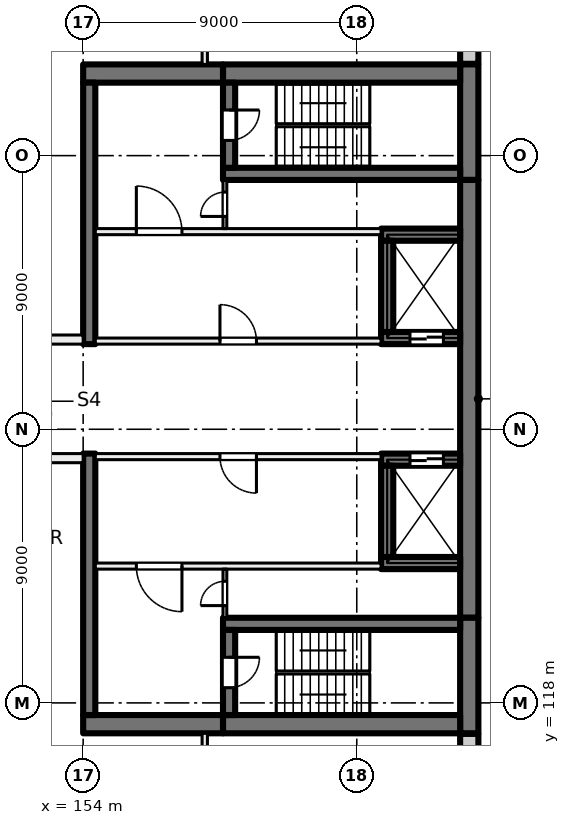
"""IFC4 building model, lengths in metres.
Left out: names, types, materials, properties, quantities, classifications, styles, units other than length and angle.
Written with IfcOpenShell. Run it as: python <this file> out.ifc"""

import sys

from ifc_helpers import new_model, si_unit, direction, frame, frame_2d, origin, place, context, subcontext, project, spatial, rectangle, extrude, element, fill, save


model = new_model("IFC4")
c1 = context("Model", 3, precision=1e-05, world=origin(), true_north=direction((0.0, 1.0)))
c2 = subcontext(c1, "Body", "Model", "MODEL_VIEW")
j1 = project(units=[si_unit("LENGTHUNIT", "METRE"), si_unit("PLANEANGLEUNIT", "RADIAN")], contexts=[c1])
p1 = place(None, origin())
s1 = spatial("IfcSite", under=j1, at=p1, CompositionType="ELEMENT")
p2 = place(p1, origin())
s2 = spatial("IfcBuilding", under=s1, at=p2, CompositionType="ELEMENT")
p3 = place(p2, frame((0.0, 0.0, 35.5)))
s3 = spatial("IfcBuildingStorey", under=s2, at=p3, CompositionType="ELEMENT", Elevation=35.5)
p4 = place(p3, frame((166.7, 139.0, 0.0), z_axis=(0.0, 0.0, 1.0), x_axis=(0.0, -1.0, 0.0)))
e1 = element("IfcWall", 1, at=p4, inside=s3, PredefinedType="SHEAR", context=c2, shape_type="SweptSolid", body=[
    extrude(rectangle(XDim=3.8, YDim=0.6, at=frame_2d((1.9, 0.0))), origin(), (0.0, 0.0, 1.0), 4.0),
])
p5 = place(p3, frame((166.7, 135.2, 0.0), z_axis=(0.0, 0.0, 1.0), x_axis=(0.0, -1.0, 0.0)))
e2 = element("IfcWall", 2, at=p5, inside=s3, PredefinedType="SHEAR", context=c2, shape_type="SweptSolid", body=[
    extrude(rectangle(XDim=14.4, YDim=0.6, at=frame_2d((7.2, 0.0))), origin(), (0.0, 0.0, 1.0), 4.0),
])
p6 = place(p3, frame((166.7, 120.8, 0.0), z_axis=(0.0, 0.0, 1.0), x_axis=(0.0, -1.0, 0.0)))
e3 = element("IfcWall", 3, at=p6, inside=s3, PredefinedType="SHEAR", context=c2, shape_type="SweptSolid", body=[
    extrude(rectangle(XDim=3.8, YDim=0.6, at=frame_2d((1.9, 0.0))), origin(), (0.0, 0.0, 1.0), 4.0),
])
for number, where, z_axis, x_axis in (
    (4, (166.4, 138.7, 0.0), (0.0, 0.0, 1.0), (-1.0, 0.0, 0.0)),
    (5, (166.4, 117.3, 0.0), (0.0, 0.0, 1.0), (-1.0, 0.0, 0.0)),
):
    element("IfcWall", number, at=place(p3, frame(where, z_axis=z_axis, x_axis=x_axis)), inside=s3, PredefinedType="SHEAR", context=c2, shape_type="SweptSolid", body=[
        extrude(rectangle(XDim=7.8, YDim=0.6, at=frame_2d((3.9, 0.0))), origin(), (0.0, 0.0, 1.0), 4.0),
    ])
for number, where, z_axis, x_axis in (
    (6, (158.6, 138.7, 0.0), (0.0, 0.0, 1.0), (-1.0, 0.0, 0.0)),
    (7, (158.6, 117.3, 0.0), (0.0, 0.0, 1.0), (-1.0, 0.0, 0.0)),
):
    element("IfcWall", number, at=place(p3, frame(where, z_axis=z_axis, x_axis=x_axis)), inside=s3, PredefinedType="SHEAR", context=c2, shape_type="SweptSolid", body=[
        extrude(rectangle(XDim=4.6, YDim=0.6, at=frame_2d((2.3, 0.0))), origin(), (0.0, 0.0, 1.0), 4.0),
    ])
p7 = place(p3, frame((166.4, 135.4, 0.0), z_axis=(0.0, 0.0, 1.0), x_axis=(-1.0, 0.0, 0.0)))
e8 = element("IfcWall", 8, at=p7, inside=s3, PredefinedType="SHEAR", context=c2, shape_type="SweptSolid", body=[
    extrude(rectangle(XDim=7.8, YDim=0.4, at=frame_2d((3.9, 0.0))), origin(), (0.0, 0.0, 1.0), 4.0),
])
p8 = place(p3, frame((158.8, 138.4, 0.0), z_axis=(0.0, 0.0, 1.0), x_axis=(0.0, -1.0, 0.0)))
e9 = element("IfcWall", 9, at=p8, inside=s3, PredefinedType="SHEAR", context=c2, shape_type="SweptSolid", body=[
    extrude(rectangle(XDim=2.8, YDim=0.4, at=frame_2d((1.4, 0.0))), origin(), (0.0, 0.0, 1.0), 4.0),
])
p9 = place(p8, frame((0.9, 0.0, 0.0)))
e10 = element("IfcOpeningElement", 10, at=p9, cuts=e9, PredefinedType="OPENING", context=c2, shape_type="SweptSolid", body=[
    extrude(rectangle(XDim=1.0, YDim=2.1, at=frame_2d((0.5, 1.05))), frame((0.0, 0.21, 0.0), z_axis=(0.0, -1.0, 0.0), x_axis=(1.0, 0.0, 0.0)), (0.0, 0.0, 1.0), 0.42),
])
p10 = place(p3, frame((166.4, 120.6, 0.0), z_axis=(0.0, 0.0, 1.0), x_axis=(-1.0, 0.0, 0.0)))
e11 = element("IfcWall", 11, at=p10, inside=s3, PredefinedType="SHEAR", context=c2, shape_type="SweptSolid", body=[
    extrude(rectangle(XDim=7.8, YDim=0.4, at=frame_2d((3.9, 0.0))), origin(), (0.0, 0.0, 1.0), 4.0),
])
p11 = place(p3, frame((158.8, 120.4, 0.0), z_axis=(0.0, 0.0, 1.0), x_axis=(0.0, -1.0, 0.0)))
e12 = element("IfcWall", 12, at=p11, inside=s3, PredefinedType="SHEAR", context=c2, shape_type="SweptSolid", body=[
    extrude(rectangle(XDim=2.8, YDim=0.4, at=frame_2d((1.4, 0.0))), origin(), (0.0, 0.0, 1.0), 4.0),
])
p12 = place(p11, frame((0.9, 0.0, 0.0)))
e13 = element("IfcOpeningElement", 13, at=p12, cuts=e12, PredefinedType="OPENING", context=c2, shape_type="SweptSolid", body=[
    extrude(rectangle(XDim=1.0, YDim=2.1, at=frame_2d((0.5, 1.05))), frame((0.0, 0.21, 0.0), z_axis=(0.0, -1.0, 0.0), x_axis=(1.0, 0.0, 0.0)), (0.0, 0.0, 1.0), 0.42),
])
p13 = place(p3, frame((166.4, 130.0, 0.0), z_axis=(0.0, 0.0, 1.0), x_axis=(-1.0, 0.0, 0.0)))
e14 = element("IfcWall", 14, at=p13, inside=s3, PredefinedType="SHEAR", context=c2, shape_type="SweptSolid", body=[
    extrude(rectangle(XDim=2.6, YDim=0.4, at=frame_2d((1.3, 0.0))), origin(), (0.0, 0.0, 1.0), 4.0),
])
p14 = place(p13, frame((0.55, 0.0, 0.0)))
e15 = element("IfcOpeningElement", 15, at=p14, cuts=e14, PredefinedType="OPENING", context=c2, shape_type="SweptSolid", body=[
    extrude(rectangle(XDim=1.1, YDim=2.1, at=frame_2d((0.55, 1.05))), frame((0.0, 0.21, 0.0), z_axis=(0.0, -1.0, 0.0), x_axis=(1.0, 0.0, 0.0)), (0.0, 0.0, 1.0), 0.42),
])
p15 = place(p3, frame((166.4, 133.4, 0.0), z_axis=(0.0, 0.0, 1.0), x_axis=(-1.0, 0.0, 0.0)))
e16 = element("IfcWall", 16, at=p15, inside=s3, PredefinedType="SHEAR", context=c2, shape_type="SweptSolid", body=[
    extrude(rectangle(XDim=2.6, YDim=0.4, at=frame_2d((1.3, 0.0))), origin(), (0.0, 0.0, 1.0), 4.0),
])
p16 = place(p3, frame((164.0, 133.2, 0.0), z_axis=(0.0, 0.0, 1.0), x_axis=(0.0, -1.0, 0.0)))
e17 = element("IfcWall", 17, at=p16, inside=s3, PredefinedType="SHEAR", context=c2, shape_type="SweptSolid", body=[
    extrude(rectangle(XDim=3.0, YDim=0.4, at=frame_2d((1.5, 0.0))), origin(), (0.0, 0.0, 1.0), 4.0),
])
p17 = place(p3, frame((166.4, 126.0, 0.0), z_axis=(0.0, 0.0, 1.0), x_axis=(-1.0, 0.0, 0.0)))
e18 = element("IfcWall", 18, at=p17, inside=s3, PredefinedType="SHEAR", context=c2, shape_type="SweptSolid", body=[
    extrude(rectangle(XDim=2.6, YDim=0.4, at=frame_2d((1.3, 0.0))), origin(), (0.0, 0.0, 1.0), 4.0),
])
p18 = place(p17, frame((0.55, 0.0, 0.0)))
e19 = element("IfcOpeningElement", 19, at=p18, cuts=e18, PredefinedType="OPENING", context=c2, shape_type="SweptSolid", body=[
    extrude(rectangle(XDim=1.1, YDim=2.1, at=frame_2d((0.55, 1.05))), frame((0.0, 0.21, 0.0), z_axis=(0.0, -1.0, 0.0), x_axis=(1.0, 0.0, 0.0)), (0.0, 0.0, 1.0), 0.42),
])
p19 = place(p3, frame((166.4, 122.6, 0.0), z_axis=(0.0, 0.0, 1.0), x_axis=(-1.0, 0.0, 0.0)))
e20 = element("IfcWall", 20, at=p19, inside=s3, PredefinedType="SHEAR", context=c2, shape_type="SweptSolid", body=[
    extrude(rectangle(XDim=2.6, YDim=0.4, at=frame_2d((1.3, 0.0))), origin(), (0.0, 0.0, 1.0), 4.0),
])
p20 = place(p3, frame((164.0, 125.8, 0.0), z_axis=(0.0, 0.0, 1.0), x_axis=(0.0, -1.0, 0.0)))
e21 = element("IfcWall", 21, at=p20, inside=s3, PredefinedType="SHEAR", context=c2, shape_type="SweptSolid", body=[
    extrude(rectangle(XDim=3.0, YDim=0.4, at=frame_2d((1.5, 0.0))), origin(), (0.0, 0.0, 1.0), 4.0),
])
for number, where, z_axis, x_axis in (
    (22, (154.2, 138.4, 0.0), (0.0, 0.0, 1.0), (0.0, -1.0, 0.0)),
    (23, (154.2, 126.2, 0.0), (0.0, 0.0, 1.0), (0.0, -1.0, 0.0)),
):
    element("IfcWall", number, at=place(p3, frame(where, z_axis=z_axis, x_axis=x_axis)), inside=s3, PredefinedType="SHEAR", context=c2, shape_type="SweptSolid", body=[
        extrude(rectangle(XDim=8.6, YDim=0.4, at=frame_2d((4.3, 0.0))), origin(), (0.0, 0.0, 1.0), 4.0),
    ])
p21 = place(p3, frame((166.7, 116.98, 0.0), z_axis=(0.0, 0.0, 1.0), x_axis=(0.0, -1.0, 0.0)))
e24 = element("IfcWall", 24, at=p21, inside=s3, PredefinedType="SOLIDWALL", context=c2, shape_type="SweptSolid", body=[
    extrude(rectangle(XDim=2.98, YDim=0.6, at=frame_2d((1.49, 0.0))), origin(), (0.0, 0.0, 1.0), 3.625),
])
p22 = place(p3, frame((166.7, 141.93, 0.0), z_axis=(0.0, 0.0, 1.0), x_axis=(0.0, -1.0, 0.0)))
e25 = element("IfcWall", 25, at=p22, inside=s3, PredefinedType="SOLIDWALL", context=c2, shape_type="SweptSolid", body=[
    extrude(rectangle(XDim=2.91, YDim=0.6, at=frame_2d((1.455, 0.0))), origin(), (0.0, 0.0, 1.0), 3.625),
])
p23 = place(p3, frame((163.8, 126.1, 0.0), z_axis=(0.0, 0.0, 1.0), x_axis=(-1.0, 0.0, 0.0)))
e26 = element("IfcWall", 26, at=p23, inside=s3, PredefinedType="PARTITIONING", context=c2, shape_type="SweptSolid", body=[
    extrude(rectangle(XDim=9.4, YDim=0.2, at=frame_2d((4.7, 0.0))), origin(), (0.0, 0.0, 1.0), 3.625),
])
p24 = place(p23, frame((4.1, 0.0, 0.0)))
e27 = element("IfcOpeningElement", 27, at=p24, cuts=e26, PredefinedType="OPENING", context=c2, shape_type="SweptSolid", body=[
    extrude(rectangle(XDim=1.2, YDim=2.1, at=frame_2d((0.6, 1.05))), frame((0.0, 0.11, 0.0), z_axis=(0.0, -1.0, 0.0), x_axis=(1.0, 0.0, 0.0)), (0.0, 0.0, 1.0), 0.22),
])
p25 = place(p3, frame((163.8, 122.5, 0.0), z_axis=(0.0, 0.0, 1.0), x_axis=(-1.0, 0.0, 0.0)))
e28 = element("IfcWall", 28, at=p25, inside=s3, PredefinedType="PARTITIONING", context=c2, shape_type="SweptSolid", body=[
    extrude(rectangle(XDim=9.4, YDim=0.2, at=frame_2d((4.7, 0.0))), origin(), (0.0, 0.0, 1.0), 3.625),
])
p26 = place(p25, frame((6.55, 0.0, 0.0)))
e29 = element("IfcOpeningElement", 29, at=p26, cuts=e28, PredefinedType="OPENING", context=c2, shape_type="SweptSolid", body=[
    extrude(rectangle(XDim=1.5, YDim=2.1, at=frame_2d((0.75, 1.05))), frame((0.0, 0.11, 0.0), z_axis=(0.0, -1.0, 0.0), x_axis=(1.0, 0.0, 0.0)), (0.0, 0.0, 1.0), 0.22),
])
p27 = place(p3, frame((158.663, 120.8, 0.0), z_axis=(0.0, 0.0, 1.0), x_axis=(0.0, 1.0, 0.0)))
e30 = element("IfcWall", 30, at=p27, inside=s3, PredefinedType="PARTITIONING", context=c2, shape_type="SweptSolid", body=[
    extrude(rectangle(XDim=1.6, YDim=0.125, at=frame_2d((0.8, 0.0))), origin(), (0.0, 0.0, 1.0), 3.625),
])
p28 = place(p27, frame((0.4, 0.0, 0.0)))
e31 = element("IfcOpeningElement", 31, at=p28, cuts=e30, PredefinedType="OPENING", context=c2, shape_type="SweptSolid", body=[
    extrude(rectangle(XDim=0.8, YDim=2.1, at=frame_2d((0.4, 1.05))), frame((0.0, 0.073, 0.0), z_axis=(0.0, -1.0, 0.0), x_axis=(1.0, 0.0, 0.0)), (0.0, 0.0, 1.0), 0.145),
])
p29 = place(p3, frame((154.4, 129.9, 0.0), z_axis=(0.0, 0.0, 1.0), x_axis=(1.0, 0.0, 0.0)))
e32 = element("IfcWall", 32, at=p29, inside=s3, PredefinedType="PARTITIONING", context=c2, shape_type="SweptSolid", body=[
    extrude(rectangle(XDim=9.4, YDim=0.2, at=frame_2d((4.7, 0.0))), origin(), (0.0, 0.0, 1.0), 3.625),
])
p30 = place(p29, frame((4.1, 0.0, 0.0)))
e33 = element("IfcOpeningElement", 33, at=p30, cuts=e32, PredefinedType="OPENING", context=c2, shape_type="SweptSolid", body=[
    extrude(rectangle(XDim=1.2, YDim=2.1, at=frame_2d((0.6, 1.05))), frame((0.0, 0.11, 0.0), z_axis=(0.0, -1.0, 0.0), x_axis=(1.0, 0.0, 0.0)), (0.0, 0.0, 1.0), 0.22),
])
p31 = place(p3, frame((154.4, 133.5, 0.0), z_axis=(0.0, 0.0, 1.0), x_axis=(1.0, 0.0, 0.0)))
e34 = element("IfcWall", 34, at=p31, inside=s3, PredefinedType="PARTITIONING", context=c2, shape_type="SweptSolid", body=[
    extrude(rectangle(XDim=9.4, YDim=0.2, at=frame_2d((4.7, 0.0))), origin(), (0.0, 0.0, 1.0), 3.625),
])
p32 = place(p31, frame((1.35, 0.0, 0.0)))
e35 = element("IfcOpeningElement", 35, at=p32, cuts=e34, PredefinedType="OPENING", context=c2, shape_type="SweptSolid", body=[
    extrude(rectangle(XDim=1.5, YDim=2.1, at=frame_2d((0.75, 1.05))), frame((0.0, 0.11, 0.0), z_axis=(0.0, -1.0, 0.0), x_axis=(1.0, 0.0, 0.0)), (0.0, 0.0, 1.0), 0.22),
])
p33 = place(p3, frame((158.663, 133.6, 0.0), z_axis=(0.0, 0.0, 1.0), x_axis=(0.0, 1.0, 0.0)))
e36 = element("IfcWall", 36, at=p33, inside=s3, PredefinedType="PARTITIONING", context=c2, shape_type="SweptSolid", body=[
    extrude(rectangle(XDim=1.6, YDim=0.125, at=frame_2d((0.8, 0.0))), origin(), (0.0, 0.0, 1.0), 3.625),
])
p34 = place(p33, frame((0.4, 0.0, 0.0)))
e37 = element("IfcOpeningElement", 37, at=p34, cuts=e36, PredefinedType="OPENING", context=c2, shape_type="SweptSolid", body=[
    extrude(rectangle(XDim=0.8, YDim=2.1, at=frame_2d((0.4, 1.05))), frame((0.0, 0.073, 0.0), z_axis=(0.0, -1.0, 0.0), x_axis=(1.0, 0.0, 0.0)), (0.0, 0.0, 1.0), 0.145),
])
p35 = place(p3, frame((140.0, 129.95, 0.0), z_axis=(0.0, 0.0, 1.0), x_axis=(1.0, 0.0, 0.0)))
e38 = element("IfcWall", 38, at=p35, inside=s3, PredefinedType="PARTITIONING", context=c2, shape_type="SweptSolid", body=[
    extrude(rectangle(XDim=14.0, YDim=0.3, at=frame_2d((7.0, 0.0))), origin(), (0.0, 0.0, 1.0), 3.625),
])
p36 = place(p35, frame((6.1, 0.0, 0.0)))
e39 = element("IfcOpeningElement", 39, at=p36, cuts=e38, PredefinedType="OPENING", context=c2, shape_type="SweptSolid", body=[
    extrude(rectangle(XDim=1.8, YDim=2.1, at=frame_2d((0.9, 1.05))), frame((0.0, 0.16, 0.0), z_axis=(0.0, -1.0, 0.0), x_axis=(1.0, 0.0, 0.0)), (0.0, 0.0, 1.0), 0.32),
])
p37 = place(p3, frame((154.0, 126.05, 0.0), z_axis=(0.0, 0.0, 1.0), x_axis=(-1.0, 0.0, 0.0)))
e40 = element("IfcWall", 40, at=p37, inside=s3, PredefinedType="PARTITIONING", context=c2, shape_type="SweptSolid", body=[
    extrude(rectangle(XDim=14.0, YDim=0.3, at=frame_2d((7.0, 0.0))), origin(), (0.0, 0.0, 1.0), 3.625),
])
p38 = place(p37, frame((10.25, 0.0, 0.0)))
e41 = element("IfcOpeningElement", 41, at=p38, cuts=e40, PredefinedType="OPENING", context=c2, shape_type="SweptSolid", body=[
    extrude(rectangle(XDim=1.0, YDim=2.1, at=frame_2d((0.5, 1.05))), frame((0.0, 0.16, 0.0), z_axis=(0.0, -1.0, 0.0), x_axis=(1.0, 0.0, 0.0)), (0.0, 0.0, 1.0), 0.32),
])
p39 = place(p37, frame((1.6, 0.0, 0.0)))
e42 = element("IfcOpeningElement", 42, at=p39, cuts=e40, PredefinedType="OPENING", context=c2, shape_type="SweptSolid", body=[
    extrude(rectangle(XDim=1.8, YDim=2.1, at=frame_2d((0.9, 1.05))), frame((0.0, 0.16, 0.0), z_axis=(0.0, -1.0, 0.0), x_axis=(1.0, 0.0, 0.0)), (0.0, 0.0, 1.0), 0.32),
])
p40 = place(p3, frame((158.0, 110.6, 0.0), z_axis=(0.0, 0.0, 1.0), x_axis=(0.0, 1.0, 0.0)))
e43 = element("IfcWall", 43, at=p40, inside=s3, PredefinedType="PARTITIONING", context=c2, shape_type="SweptSolid", body=[
    extrude(rectangle(XDim=6.4, YDim=0.175, at=frame_2d((3.2, 0.0))), origin(), (0.0, 0.0, 1.0), 3.625),
])
p41 = place(p40, frame((2.6, 0.0, 0.0)))
e44 = element("IfcOpeningElement", 44, at=p41, cuts=e43, PredefinedType="OPENING", context=c2, shape_type="SweptSolid", body=[
    extrude(rectangle(XDim=1.2, YDim=2.1, at=frame_2d((0.6, 1.05))), frame((0.0, 0.097, 0.0), z_axis=(0.0, -1.0, 0.0), x_axis=(1.0, 0.0, 0.0)), (0.0, 0.0, 1.0), 0.195),
])
p42 = place(p3, frame((158.0, 139.0, 0.0), z_axis=(0.0, 0.0, 1.0), x_axis=(0.0, 1.0, 0.0)))
e45 = element("IfcWall", 45, at=p42, inside=s3, PredefinedType="PARTITIONING", context=c2, shape_type="SweptSolid", body=[
    extrude(rectangle(XDim=6.4, YDim=0.175, at=frame_2d((3.2, 0.0))), origin(), (0.0, 0.0, 1.0), 3.625),
])
p43 = place(p42, frame((2.6, 0.0, 0.0)))
e46 = element("IfcOpeningElement", 46, at=p43, cuts=e45, PredefinedType="OPENING", context=c2, shape_type="SweptSolid", body=[
    extrude(rectangle(XDim=1.2, YDim=2.1, at=frame_2d((0.6, 1.05))), frame((0.0, 0.097, 0.0), z_axis=(0.0, -1.0, 0.0), x_axis=(1.0, 0.0, 0.0)), (0.0, 0.0, 1.0), 0.195),
])
p44 = place(p18, origin())
e47 = element("IfcDoor", 47, at=p44, inside=s3, OperationType="DOUBLE_DOOR_SLIDING", PredefinedType="DOOR", context=c2, shape_type="SweptSolid", body=[
    extrude(rectangle(XDim=1.1, YDim=2.1, at=frame_2d((0.55, 1.05))), frame((0.0, 0.025, 0.0), z_axis=(0.0, -1.0, 0.0), x_axis=(1.0, 0.0, 0.0)), (0.0, 0.0, 1.0), 0.05),
])
fill(e19, e47)
p45 = place(p14, origin())
e48 = element("IfcDoor", 48, at=p45, inside=s3, OperationType="DOUBLE_DOOR_SLIDING", PredefinedType="DOOR", context=c2, shape_type="SweptSolid", body=[
    extrude(rectangle(XDim=1.1, YDim=2.1, at=frame_2d((0.55, 1.05))), frame((0.0, 0.025, 0.0), z_axis=(0.0, -1.0, 0.0), x_axis=(1.0, 0.0, 0.0)), (0.0, 0.0, 1.0), 0.05),
])
fill(e15, e48)
p46 = place(p24, origin())
e49 = element("IfcDoor", 49, at=p46, inside=s3, OperationType="DOUBLE_DOOR_SINGLE_SWING", PredefinedType="DOOR", context=c2, shape_type="SweptSolid", body=[
    extrude(rectangle(XDim=1.2, YDim=2.1, at=frame_2d((0.6, 1.05))), frame((0.0, 0.025, 0.0), z_axis=(0.0, -1.0, 0.0), x_axis=(1.0, 0.0, 0.0)), (0.0, 0.0, 1.0), 0.05),
])
fill(e27, e49)
p47 = place(p26, origin())
e50 = element("IfcDoor", 50, at=p47, inside=s3, OperationType="DOUBLE_DOOR_SINGLE_SWING", PredefinedType="DOOR", context=c2, shape_type="SweptSolid", body=[
    extrude(rectangle(XDim=1.5, YDim=2.1, at=frame_2d((0.75, 1.05))), frame((0.0, 0.025, 0.0), z_axis=(0.0, -1.0, 0.0), x_axis=(1.0, 0.0, 0.0)), (0.0, 0.0, 1.0), 0.05),
])
fill(e29, e50)
p48 = place(p12, origin())
e51 = element("IfcDoor", 51, at=p48, inside=s3, OperationType="SINGLE_SWING_LEFT", PredefinedType="DOOR", context=c2, shape_type="SweptSolid", body=[
    extrude(rectangle(XDim=1.0, YDim=2.1, at=frame_2d((0.5, 1.05))), frame((0.0, 0.025, 0.0), z_axis=(0.0, -1.0, 0.0), x_axis=(1.0, 0.0, 0.0)), (0.0, 0.0, 1.0), 0.05),
])
fill(e13, e51)
p49 = place(p28, origin())
e52 = element("IfcDoor", 52, at=p49, inside=s3, OperationType="SINGLE_SWING_RIGHT", PredefinedType="DOOR", context=c2, shape_type="SweptSolid", body=[
    extrude(rectangle(XDim=0.8, YDim=2.1, at=frame_2d((0.4, 1.05))), frame((0.0, 0.025, 0.0), z_axis=(0.0, -1.0, 0.0), x_axis=(1.0, 0.0, 0.0)), (0.0, 0.0, 1.0), 0.05),
])
fill(e31, e52)
p50 = place(p30, origin())
e53 = element("IfcDoor", 53, at=p50, inside=s3, OperationType="DOUBLE_DOOR_SINGLE_SWING", PredefinedType="DOOR", context=c2, shape_type="SweptSolid", body=[
    extrude(rectangle(XDim=1.2, YDim=2.1, at=frame_2d((0.6, 1.05))), frame((0.0, 0.025, 0.0), z_axis=(0.0, -1.0, 0.0), x_axis=(1.0, 0.0, 0.0)), (0.0, 0.0, 1.0), 0.05),
])
fill(e33, e53)
p51 = place(p32, origin())
e54 = element("IfcDoor", 54, at=p51, inside=s3, OperationType="DOUBLE_DOOR_SINGLE_SWING", PredefinedType="DOOR", context=c2, shape_type="SweptSolid", body=[
    extrude(rectangle(XDim=1.5, YDim=2.1, at=frame_2d((0.75, 1.05))), frame((0.0, 0.025, 0.0), z_axis=(0.0, -1.0, 0.0), x_axis=(1.0, 0.0, 0.0)), (0.0, 0.0, 1.0), 0.05),
])
fill(e35, e54)
p52 = place(p9, origin())
e55 = element("IfcDoor", 55, at=p52, inside=s3, OperationType="SINGLE_SWING_RIGHT", PredefinedType="DOOR", context=c2, shape_type="SweptSolid", body=[
    extrude(rectangle(XDim=1.0, YDim=2.1, at=frame_2d((0.5, 1.05))), frame((0.0, 0.025, 0.0), z_axis=(0.0, -1.0, 0.0), x_axis=(1.0, 0.0, 0.0)), (0.0, 0.0, 1.0), 0.05),
])
fill(e10, e55)
p53 = place(p34, origin())
e56 = element("IfcDoor", 56, at=p53, inside=s3, OperationType="SINGLE_SWING_LEFT", PredefinedType="DOOR", context=c2, shape_type="SweptSolid", body=[
    extrude(rectangle(XDim=0.8, YDim=2.1, at=frame_2d((0.4, 1.05))), frame((0.0, 0.025, 0.0), z_axis=(0.0, -1.0, 0.0), x_axis=(1.0, 0.0, 0.0)), (0.0, 0.0, 1.0), 0.05),
])
fill(e37, e56)
save(model, sys.argv[1])
